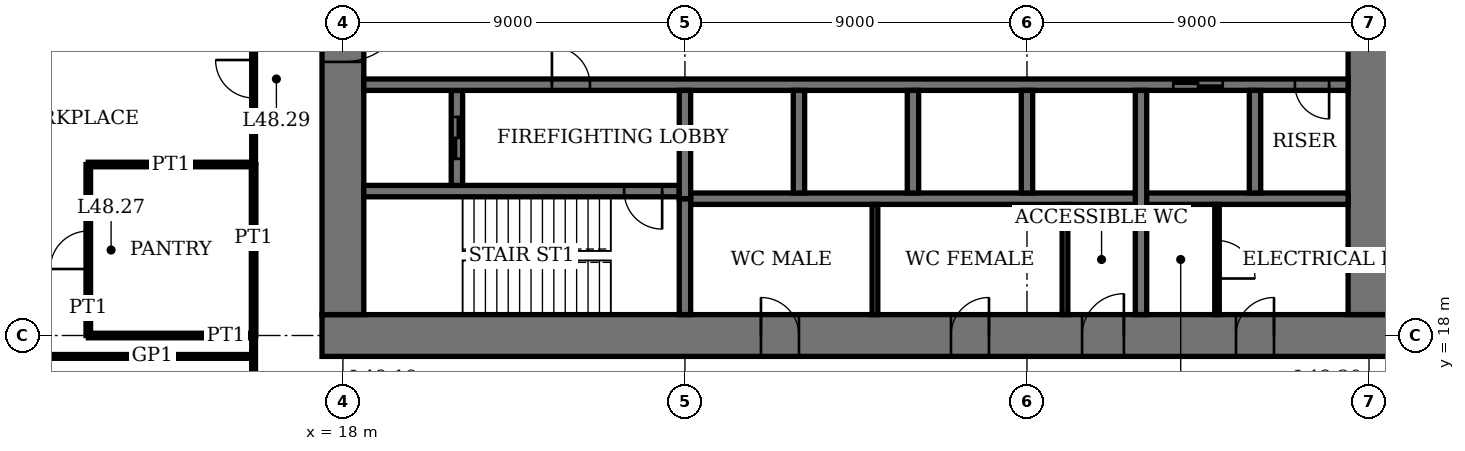
"""IFC4 building model, lengths in metres.
Left out: names, types, materials, properties, quantities, classifications, styles, units other than length and angle.
Written with IfcOpenShell. Run it as: python <this file> out.ifc"""

import sys

from ifc_helpers import new_model, si_unit, direction, frame, frame_2d, origin, place, context, subcontext, project, spatial, rectangle, extrude, element, fill, save


model = new_model("IFC4")
c1 = context("Model", 3, precision=1e-05, world=origin(), true_north=direction((0.0, 1.0)))
c2 = subcontext(c1, "Body", "Model", "MODEL_VIEW")
j1 = project(units=[si_unit("LENGTHUNIT", "METRE"), si_unit("PLANEANGLEUNIT", "RADIAN")], contexts=[c1])
p1 = place(None, origin())
s1 = spatial("IfcSite", under=j1, at=p1, CompositionType="ELEMENT")
p2 = place(p1, origin())
s2 = spatial("IfcBuilding", under=s1, at=p2, CompositionType="ELEMENT")
p3 = place(p2, frame((0.0, 0.0, 198.2)))
s3 = spatial("IfcBuildingStorey", under=s2, at=p3, CompositionType="ELEMENT", Elevation=198.2)
p4 = place(p3, frame((17.45, 18.0, 0.0), z_axis=(0.0, 0.0, 1.0), x_axis=(1.0, 0.0, 0.0)))
e1 = element("IfcWall", 1, at=p4, inside=s3, PredefinedType="SHEAR", context=c2, shape_type="SweptSolid", body=[
    extrude(rectangle(XDim=28.1, YDim=1.1, at=frame_2d((14.05, 0.0))), origin(), (0.0, 0.0, 1.0), 4.0),
])
p5 = place(p4, frame((11.55, 0.0, 0.0)))
e2 = element("IfcOpeningElement", 2, at=p5, cuts=e1, PredefinedType="OPENING", context=c2, shape_type="SweptSolid", body=[
    extrude(rectangle(XDim=1.0, YDim=2.4, at=frame_2d((0.5, 1.2))), frame((0.0, 0.56, 0.0), z_axis=(0.0, -1.0, 0.0), x_axis=(1.0, 0.0, 0.0)), (0.0, 0.0, 1.0), 1.12),
])
p6 = place(p4, frame((16.55, 0.0, 0.0)))
e3 = element("IfcOpeningElement", 3, at=p6, cuts=e1, PredefinedType="OPENING", context=c2, shape_type="SweptSolid", body=[
    extrude(rectangle(XDim=1.0, YDim=2.4, at=frame_2d((0.5, 1.2))), frame((0.0, 0.56, 0.0), z_axis=(0.0, -1.0, 0.0), x_axis=(1.0, 0.0, 0.0)), (0.0, 0.0, 1.0), 1.12),
])
p7 = place(p4, frame((20.0, 0.0, 0.0)))
e4 = element("IfcOpeningElement", 4, at=p7, cuts=e1, PredefinedType="OPENING", context=c2, shape_type="SweptSolid", body=[
    extrude(rectangle(XDim=1.1, YDim=2.4, at=frame_2d((0.55, 1.2))), frame((0.0, 0.56, 0.0), z_axis=(0.0, -1.0, 0.0), x_axis=(1.0, 0.0, 0.0)), (0.0, 0.0, 1.0), 1.12),
])
p8 = place(p4, frame((24.05, 0.0, 0.0)))
e5 = element("IfcOpeningElement", 5, at=p8, cuts=e1, PredefinedType="OPENING", context=c2, shape_type="SweptSolid", body=[
    extrude(rectangle(XDim=1.0, YDim=2.4, at=frame_2d((0.5, 1.2))), frame((0.0, 0.56, 0.0), z_axis=(0.0, -1.0, 0.0), x_axis=(1.0, 0.0, 0.0)), (0.0, 0.0, 1.0), 1.12),
])
p9 = place(p3, frame((18.0, 35.45, 0.0), z_axis=(0.0, 0.0, 1.0), x_axis=(0.0, -1.0, 0.0)))
e6 = element("IfcWall", 6, at=p9, inside=s3, PredefinedType="SHEAR", context=c2, shape_type="SweptSolid", body=[
    extrude(rectangle(XDim=16.9, YDim=1.1, at=frame_2d((8.45, 0.0))), origin(), (0.0, 0.0, 1.0), 4.0),
])
p10 = place(p9, frame((8.45, 0.0, 0.0)))
e7 = element("IfcOpeningElement", 7, at=p10, cuts=e6, PredefinedType="OPENING", context=c2, shape_type="SweptSolid", body=[
    extrude(rectangle(XDim=1.8, YDim=2.4, at=frame_2d((0.9, 1.2))), frame((0.0, 0.56, 0.0), z_axis=(0.0, -1.0, 0.0), x_axis=(1.0, 0.0, 0.0)), (0.0, 0.0, 1.0), 1.12),
])
p11 = place(p3, frame((45.0, 18.55, 0.0), z_axis=(0.0, 0.0, 1.0), x_axis=(0.0, 1.0, 0.0)))
e8 = element("IfcWall", 8, at=p11, inside=s3, PredefinedType="SHEAR", context=c2, shape_type="SweptSolid", body=[
    extrude(rectangle(XDim=16.9, YDim=1.1, at=frame_2d((8.45, 0.0))), origin(), (0.0, 0.0, 1.0), 4.0),
])
p12 = place(p11, frame((8.45, 0.0, 0.0)))
e9 = element("IfcOpeningElement", 9, at=p12, cuts=e8, PredefinedType="OPENING", context=c2, shape_type="SweptSolid", body=[
    extrude(rectangle(XDim=1.8, YDim=2.4, at=frame_2d((0.9, 1.2))), frame((0.0, 0.56, 0.0), z_axis=(0.0, -1.0, 0.0), x_axis=(1.0, 0.0, 0.0)), (0.0, 0.0, 1.0), 1.12),
])
p13 = place(p3, frame((18.55, 21.8, 0.0), z_axis=(0.0, 0.0, 1.0), x_axis=(1.0, 0.0, 0.0)))
e10 = element("IfcWall", 10, at=p13, inside=s3, PredefinedType="SHEAR", context=c2, shape_type="SweptSolid", body=[
    extrude(rectangle(XDim=8.3, YDim=0.3, at=frame_2d((4.15, 0.0))), origin(), (0.0, 0.0, 1.0), 4.0),
])
p14 = place(p13, frame((6.85, 0.0, 0.0)))
e11 = element("IfcOpeningElement", 11, at=p14, cuts=e10, PredefinedType="OPENING", context=c2, shape_type="SweptSolid", body=[
    extrude(rectangle(XDim=1.0, YDim=2.4, at=frame_2d((0.5, 1.2))), frame((0.0, 0.16, 0.0), z_axis=(0.0, -1.0, 0.0), x_axis=(1.0, 0.0, 0.0)), (0.0, 0.0, 1.0), 0.32),
])
p15 = place(p3, frame((27.0, 18.55, 0.0), z_axis=(0.0, 0.0, 1.0), x_axis=(0.0, 1.0, 0.0)))
e12 = element("IfcWall", 12, at=p15, inside=s3, PredefinedType="SHEAR", context=c2, shape_type="SweptSolid", body=[
    extrude(rectangle(XDim=3.05, YDim=0.3, at=frame_2d((1.525, 0.0))), origin(), (0.0, 0.0, 1.0), 4.0),
])
p16 = place(p3, frame((21.0, 21.95, 0.0), z_axis=(0.0, 0.0, 1.0), x_axis=(0.0, 1.0, 0.0)))
e13 = element("IfcWall", 13, at=p16, inside=s3, PredefinedType="SHEAR", context=c2, shape_type="SweptSolid", body=[
    extrude(rectangle(XDim=2.5, YDim=0.3, at=frame_2d((1.25, 0.0))), origin(), (0.0, 0.0, 1.0), 4.0),
])
p17 = place(p16, frame((0.7, 0.0, 0.0)))
e14 = element("IfcOpeningElement", 14, at=p17, cuts=e13, PredefinedType="OPENING", context=c2, shape_type="SweptSolid", body=[
    extrude(rectangle(XDim=1.1, YDim=2.4, at=frame_2d((0.55, 1.2))), frame((0.0, 0.16, 0.0), z_axis=(0.0, -1.0, 0.0), x_axis=(1.0, 0.0, 0.0)), (0.0, 0.0, 1.0), 0.32),
])
p18 = place(p3, frame((18.55, 24.6, 0.0), z_axis=(0.0, 0.0, 1.0), x_axis=(1.0, 0.0, 0.0)))
e15 = element("IfcWall", 15, at=p18, inside=s3, PredefinedType="SHEAR", context=c2, shape_type="SweptSolid", body=[
    extrude(rectangle(XDim=25.9, YDim=0.3, at=frame_2d((12.95, 0.0))), origin(), (0.0, 0.0, 1.0), 4.0),
])
p19 = place(p18, frame((4.95, 0.0, 0.0)))
e16 = element("IfcOpeningElement", 16, at=p19, cuts=e15, PredefinedType="OPENING", context=c2, shape_type="SweptSolid", body=[
    extrude(rectangle(XDim=1.0, YDim=2.4, at=frame_2d((0.5, 1.2))), frame((0.0, 0.16, 0.0), z_axis=(0.0, -1.0, 0.0), x_axis=(1.0, 0.0, 0.0)), (0.0, 0.0, 1.0), 0.32),
])
p20 = place(p18, frame((24.5, 0.0, 0.0)))
e17 = element("IfcOpeningElement", 17, at=p20, cuts=e15, PredefinedType="OPENING", context=c2, shape_type="SweptSolid", body=[
    extrude(rectangle(XDim=0.9, YDim=2.1, at=frame_2d((0.45, 1.05))), frame((0.0, 0.16, 0.0), z_axis=(0.0, -1.0, 0.0), x_axis=(1.0, 0.0, 0.0)), (0.0, 0.0, 1.0), 0.32),
])
p21 = place(p18, frame((21.3, 0.0, 0.0)))
e18 = element("IfcOpeningElement", 18, at=p21, cuts=e15, PredefinedType="OPENING", context=c2, shape_type="SweptSolid", body=[
    extrude(rectangle(XDim=1.3, YDim=2.4, at=frame_2d((0.65, 1.2))), frame((0.0, 0.16, 0.0), z_axis=(0.0, -1.0, 0.0), x_axis=(1.0, 0.0, 0.0)), (0.0, 0.0, 1.0), 0.32),
])
p22 = place(p3, frame((27.15, 21.6, 0.0), z_axis=(0.0, 0.0, 1.0), x_axis=(1.0, 0.0, 0.0)))
e19 = element("IfcWall", 19, at=p22, inside=s3, PredefinedType="SHEAR", context=c2, shape_type="SweptSolid", body=[
    extrude(rectangle(XDim=17.3, YDim=0.3, at=frame_2d((8.65, 0.0))), origin(), (0.0, 0.0, 1.0), 4.0),
])
for number, where, z_axis, x_axis in (
    (20, (30.0, 21.75, 0.0), (0.0, 0.0, 1.0), (0.0, 1.0, 0.0)),
    (21, (33.0, 21.75, 0.0), (0.0, 0.0, 1.0), (0.0, 1.0, 0.0)),
    (22, (36.0, 21.75, 0.0), (0.0, 0.0, 1.0), (0.0, 1.0, 0.0)),
):
    element("IfcWall", number, at=place(p3, frame(where, z_axis=z_axis, x_axis=x_axis)), inside=s3, PredefinedType="SHEAR", context=c2, shape_type="SweptSolid", body=[
        extrude(rectangle(XDim=2.7, YDim=0.3, at=frame_2d((1.35, 0.0))), origin(), (0.0, 0.0, 1.0), 4.0),
    ])
p23 = place(p3, frame((39.0, 18.55, 0.0), z_axis=(0.0, 0.0, 1.0), x_axis=(0.0, 1.0, 0.0)))
e23 = element("IfcWall", 23, at=p23, inside=s3, PredefinedType="SHEAR", context=c2, shape_type="SweptSolid", body=[
    extrude(rectangle(XDim=5.9, YDim=0.3, at=frame_2d((2.95, 0.0))), origin(), (0.0, 0.0, 1.0), 4.0),
])
p24 = place(p3, frame((42.0, 21.75, 0.0), z_axis=(0.0, 0.0, 1.0), x_axis=(0.0, 1.0, 0.0)))
e24 = element("IfcWall", 24, at=p24, inside=s3, PredefinedType="SHEAR", context=c2, shape_type="SweptSolid", body=[
    extrude(rectangle(XDim=2.7, YDim=0.3, at=frame_2d((1.35, 0.0))), origin(), (0.0, 0.0, 1.0), 4.0),
])
p25 = place(p3, frame((27.0, 21.6, 0.0), z_axis=(0.0, 0.0, 1.0), x_axis=(0.0, 1.0, 0.0)))
e25 = element("IfcWall", 25, at=p25, inside=s3, PredefinedType="SHEAR", context=c2, shape_type="SweptSolid", body=[
    extrude(rectangle(XDim=2.85, YDim=0.3, at=frame_2d((1.425, 0.0))), origin(), (0.0, 0.0, 1.0), 4.0),
])
p26 = place(p3, frame((9.7, 17.45, 0.0), z_axis=(0.0, 0.0, 1.0), x_axis=(1.0, 0.0, 0.0)))
e26 = element("IfcWall", 26, at=p26, inside=s3, PredefinedType="PARTITIONING", context=c2, shape_type="SweptSolid", body=[
    extrude(rectangle(XDim=5.95, YDim=0.1, at=frame_2d((2.975, 0.0))), origin(), (0.0, 0.0, 1.0), 3.75),
])
p27 = place(p3, frame((11.3, 18.0, 0.0), z_axis=(0.0, 0.0, 1.0), x_axis=(1.0, 0.0, 0.0)))
e27 = element("IfcWall", 27, at=p27, inside=s3, PredefinedType="PARTITIONING", context=c2, shape_type="SweptSolid", body=[
    extrude(rectangle(XDim=4.35, YDim=0.12, at=frame_2d((2.175, 0.0))), origin(), (0.0, 0.0, 1.0), 3.05),
])
p28 = place(p3, frame((11.3, 22.5, 0.0), z_axis=(0.0, 0.0, 1.0), x_axis=(1.0, 0.0, 0.0)))
e28 = element("IfcWall", 28, at=p28, inside=s3, PredefinedType="PARTITIONING", context=c2, shape_type="SweptSolid", body=[
    extrude(rectangle(XDim=4.35, YDim=0.12, at=frame_2d((2.175, 0.0))), origin(), (0.0, 0.0, 1.0), 3.1),
])
p29 = place(p3, frame((11.3, 18.0, 0.0), z_axis=(0.0, 0.0, 1.0), x_axis=(0.0, 1.0, 0.0)))
e29 = element("IfcWall", 29, at=p29, inside=s3, PredefinedType="PARTITIONING", context=c2, shape_type="SweptSolid", body=[
    extrude(rectangle(XDim=4.5, YDim=0.12, at=frame_2d((2.25, 0.0))), origin(), (0.0, 0.0, 1.0), 3.75),
])
p30 = place(p29, frame((1.75, 0.0, 0.0)))
e30 = element("IfcOpeningElement", 30, at=p30, cuts=e29, PredefinedType="OPENING", context=c2, shape_type="SweptSolid", body=[
    extrude(rectangle(XDim=1.0, YDim=2.4, at=frame_2d((0.5, 1.2))), frame((0.0, 0.07, 0.0), z_axis=(0.0, -1.0, 0.0), x_axis=(1.0, 0.0, 0.0)), (0.0, 0.0, 1.0), 0.14),
])
p31 = place(p3, frame((15.65, 18.0, 0.0), z_axis=(0.0, 0.0, 1.0), x_axis=(0.0, 1.0, 0.0)))
e31 = element("IfcWall", 31, at=p31, inside=s3, PredefinedType="PARTITIONING", context=c2, shape_type="SweptSolid", body=[
    extrude(rectangle(XDim=4.5, YDim=0.12, at=frame_2d((2.25, 0.0))), origin(), (0.0, 0.0, 1.0), 3.75),
])
p32 = place(p3, frame((15.65, 15.65, 0.0), z_axis=(0.0, 0.0, 1.0), x_axis=(0.0, 1.0, 0.0)))
e32 = element("IfcWall", 32, at=p32, inside=s3, PredefinedType="PARTITIONING", context=c2, shape_type="SweptSolid", body=[
    extrude(rectangle(XDim=2.35, YDim=0.1, at=frame_2d((1.175, 0.0))), origin(), (0.0, 0.0, 1.0), 3.75),
])
p33 = place(p3, frame((15.65, 22.5, 0.0), z_axis=(0.0, 0.0, 1.0), x_axis=(0.0, 1.0, 0.0)))
e33 = element("IfcWall", 33, at=p33, inside=s3, PredefinedType="PARTITIONING", context=c2, shape_type="SweptSolid", body=[
    extrude(rectangle(XDim=4.5, YDim=0.1, at=frame_2d((2.25, 0.0))), origin(), (0.0, 0.0, 1.0), 3.75),
])
p34 = place(p33, frame((1.75, 0.0, 0.0)))
e34 = element("IfcOpeningElement", 34, at=p34, cuts=e33, PredefinedType="OPENING", context=c2, shape_type="SweptSolid", body=[
    extrude(rectangle(XDim=1.0, YDim=2.4, at=frame_2d((0.5, 1.2))), frame((0.0, 0.06, 0.0), z_axis=(0.0, -1.0, 0.0), x_axis=(1.0, 0.0, 0.0)), (0.0, 0.0, 1.0), 0.12),
])
for number, where, z_axis, x_axis in (
    (35, (32.0, 18.55, 0.0), (0.0, 0.0, 1.0), (0.0, 1.0, 0.0)),
    (36, (37.0, 18.55, 0.0), (0.0, 0.0, 1.0), (0.0, 1.0, 0.0)),
):
    element("IfcWall", number, at=place(p3, frame(where, z_axis=z_axis, x_axis=x_axis)), inside=s3, PredefinedType="PARTITIONING", context=c2, shape_type="SweptSolid", body=[
        extrude(rectangle(XDim=2.9, YDim=0.15, at=frame_2d((1.45, 0.0))), origin(), (0.0, 0.0, 1.0), 3.75),
    ])
p35 = place(p3, frame((41.0, 18.55, 0.0), z_axis=(0.0, 0.0, 1.0), x_axis=(0.0, 1.0, 0.0)))
e37 = element("IfcWall", 37, at=p35, inside=s3, PredefinedType="PARTITIONING", context=c2, shape_type="SweptSolid", body=[
    extrude(rectangle(XDim=2.9, YDim=0.12, at=frame_2d((1.45, 0.0))), origin(), (0.0, 0.0, 1.0), 3.75),
])
p36 = place(p35, frame((0.95, 0.0, 0.0)))
e38 = element("IfcOpeningElement", 38, at=p36, cuts=e37, PredefinedType="OPENING", context=c2, shape_type="SweptSolid", body=[
    extrude(rectangle(XDim=1.0, YDim=2.4, at=frame_2d((0.5, 1.2))), frame((0.0, 0.07, 0.0), z_axis=(0.0, -1.0, 0.0), x_axis=(1.0, 0.0, 0.0)), (0.0, 0.0, 1.0), 0.14),
])
p37 = place(p10, origin())
e39 = element("IfcDoor", 39, at=p37, inside=s3, OperationType="DOUBLE_DOOR_DOUBLE_SWING", PredefinedType="DOOR", context=c2, shape_type="SweptSolid", body=[
    extrude(rectangle(XDim=1.8, YDim=2.4, at=frame_2d((0.9, 1.2))), frame((0.0, 0.03, 0.0), z_axis=(0.0, -1.0, 0.0), x_axis=(1.0, 0.0, 0.0)), (0.0, 0.0, 1.0), 0.06),
    extrude(rectangle(XDim=0.04, YDim=2.4, at=frame_2d((0.02, 1.2))), frame((0.0, 0.55, 0.0), z_axis=(0.0, -1.0, 0.0), x_axis=(1.0, 0.0, 0.0)), (0.0, 0.0, 1.0), 1.1),
    extrude(rectangle(XDim=0.04, YDim=2.4, at=frame_2d((1.78, 1.2))), frame((0.0, 0.55, 0.0), z_axis=(0.0, -1.0, 0.0), x_axis=(1.0, 0.0, 0.0)), (0.0, 0.0, 1.0), 1.1),
    extrude(rectangle(XDim=1.8, YDim=0.04, at=frame_2d((0.9, 2.38))), frame((0.0, 0.55, 0.0), z_axis=(0.0, -1.0, 0.0), x_axis=(1.0, 0.0, 0.0)), (0.0, 0.0, 1.0), 1.1),
])
fill(e7, e39)
p38 = place(p5, origin())
e40 = element("IfcDoor", 40, at=p38, inside=s3, OperationType="SINGLE_SWING_RIGHT", PredefinedType="DOOR", context=c2, shape_type="SweptSolid", body=[
    extrude(rectangle(XDim=1.0, YDim=2.4, at=frame_2d((0.5, 1.2))), frame((0.0, 0.025, 0.0), z_axis=(0.0, -1.0, 0.0), x_axis=(1.0, 0.0, 0.0)), (0.0, 0.0, 1.0), 0.05),
    extrude(rectangle(XDim=0.04, YDim=2.4, at=frame_2d((0.02, 1.2))), frame((0.0, 0.4, 0.0), z_axis=(0.0, -1.0, 0.0), x_axis=(1.0, 0.0, 0.0)), (0.0, 0.0, 1.0), 0.8),
    extrude(rectangle(XDim=0.04, YDim=2.4, at=frame_2d((0.98, 1.2))), frame((0.0, 0.4, 0.0), z_axis=(0.0, -1.0, 0.0), x_axis=(1.0, 0.0, 0.0)), (0.0, 0.0, 1.0), 0.8),
    extrude(rectangle(XDim=1.0, YDim=0.04, at=frame_2d((0.5, 2.38))), frame((0.0, 0.4, 0.0), z_axis=(0.0, -1.0, 0.0), x_axis=(1.0, 0.0, 0.0)), (0.0, 0.0, 1.0), 0.8),
])
fill(e2, e40)
p39 = place(p6, origin())
e41 = element("IfcDoor", 41, at=p39, inside=s3, OperationType="SINGLE_SWING_LEFT", PredefinedType="DOOR", context=c2, shape_type="SweptSolid", body=[
    extrude(rectangle(XDim=1.0, YDim=2.4, at=frame_2d((0.5, 1.2))), frame((0.0, 0.025, 0.0), z_axis=(0.0, -1.0, 0.0), x_axis=(1.0, 0.0, 0.0)), (0.0, 0.0, 1.0), 0.05),
    extrude(rectangle(XDim=0.04, YDim=2.4, at=frame_2d((0.02, 1.2))), frame((0.0, 0.4, 0.0), z_axis=(0.0, -1.0, 0.0), x_axis=(1.0, 0.0, 0.0)), (0.0, 0.0, 1.0), 0.8),
    extrude(rectangle(XDim=0.04, YDim=2.4, at=frame_2d((0.98, 1.2))), frame((0.0, 0.4, 0.0), z_axis=(0.0, -1.0, 0.0), x_axis=(1.0, 0.0, 0.0)), (0.0, 0.0, 1.0), 0.8),
    extrude(rectangle(XDim=1.0, YDim=0.04, at=frame_2d((0.5, 2.38))), frame((0.0, 0.4, 0.0), z_axis=(0.0, -1.0, 0.0), x_axis=(1.0, 0.0, 0.0)), (0.0, 0.0, 1.0), 0.8),
])
fill(e3, e41)
p40 = place(p7, origin())
e42 = element("IfcDoor", 42, at=p40, inside=s3, OperationType="SINGLE_SWING_LEFT", PredefinedType="DOOR", context=c2, shape_type="SweptSolid", body=[
    extrude(rectangle(XDim=1.1, YDim=2.4, at=frame_2d((0.55, 1.2))), frame((0.0, 0.025, 0.0), z_axis=(0.0, -1.0, 0.0), x_axis=(1.0, 0.0, 0.0)), (0.0, 0.0, 1.0), 0.05),
    extrude(rectangle(XDim=0.04, YDim=2.4, at=frame_2d((0.02, 1.2))), frame((0.0, 0.44, 0.0), z_axis=(0.0, -1.0, 0.0), x_axis=(1.0, 0.0, 0.0)), (0.0, 0.0, 1.0), 0.88),
    extrude(rectangle(XDim=0.04, YDim=2.4, at=frame_2d((1.08, 1.2))), frame((0.0, 0.44, 0.0), z_axis=(0.0, -1.0, 0.0), x_axis=(1.0, 0.0, 0.0)), (0.0, 0.0, 1.0), 0.88),
    extrude(rectangle(XDim=1.1, YDim=0.04, at=frame_2d((0.55, 2.38))), frame((0.0, 0.44, 0.0), z_axis=(0.0, -1.0, 0.0), x_axis=(1.0, 0.0, 0.0)), (0.0, 0.0, 1.0), 0.88),
])
fill(e4, e42)
p41 = place(p8, origin())
e43 = element("IfcDoor", 43, at=p41, inside=s3, OperationType="SINGLE_SWING_LEFT", PredefinedType="DOOR", context=c2, shape_type="SweptSolid", body=[
    extrude(rectangle(XDim=1.0, YDim=2.4, at=frame_2d((0.5, 1.2))), frame((0.0, 0.025, 0.0), z_axis=(0.0, -1.0, 0.0), x_axis=(1.0, 0.0, 0.0)), (0.0, 0.0, 1.0), 0.05),
    extrude(rectangle(XDim=0.04, YDim=2.4, at=frame_2d((0.02, 1.2))), frame((0.0, 0.4, 0.0), z_axis=(0.0, -1.0, 0.0), x_axis=(1.0, 0.0, 0.0)), (0.0, 0.0, 1.0), 0.8),
    extrude(rectangle(XDim=0.04, YDim=2.4, at=frame_2d((0.98, 1.2))), frame((0.0, 0.4, 0.0), z_axis=(0.0, -1.0, 0.0), x_axis=(1.0, 0.0, 0.0)), (0.0, 0.0, 1.0), 0.8),
    extrude(rectangle(XDim=1.0, YDim=0.04, at=frame_2d((0.5, 2.38))), frame((0.0, 0.4, 0.0), z_axis=(0.0, -1.0, 0.0), x_axis=(1.0, 0.0, 0.0)), (0.0, 0.0, 1.0), 0.8),
])
fill(e5, e43)
p42 = place(p14, origin())
e44 = element("IfcDoor", 44, at=p42, inside=s3, OperationType="SINGLE_SWING_RIGHT", PredefinedType="DOOR", context=c2, shape_type="SweptSolid", body=[
    extrude(rectangle(XDim=1.0, YDim=2.4, at=frame_2d((0.5, 1.2))), frame((0.0, 0.03, 0.0), z_axis=(0.0, -1.0, 0.0), x_axis=(1.0, 0.0, 0.0)), (0.0, 0.0, 1.0), 0.06),
])
fill(e11, e44)
p43 = place(p19, origin())
e45 = element("IfcDoor", 45, at=p43, inside=s3, OperationType="SINGLE_SWING_RIGHT", PredefinedType="DOOR", context=c2, shape_type="SweptSolid", body=[
    extrude(rectangle(XDim=1.0, YDim=2.4, at=frame_2d((0.5, 1.2))), frame((0.0, 0.03, 0.0), z_axis=(0.0, -1.0, 0.0), x_axis=(1.0, 0.0, 0.0)), (0.0, 0.0, 1.0), 0.06),
])
fill(e16, e45)
p44 = place(p20, origin())
e46 = element("IfcDoor", 46, at=p44, inside=s3, OperationType="SINGLE_SWING_RIGHT", PredefinedType="DOOR", context=c2, shape_type="SweptSolid", body=[
    extrude(rectangle(XDim=0.9, YDim=2.1, at=frame_2d((0.45, 1.05))), frame((0.0, 0.03, 0.0), z_axis=(0.0, -1.0, 0.0), x_axis=(1.0, 0.0, 0.0)), (0.0, 0.0, 1.0), 0.06),
])
fill(e17, e46)
p45 = place(p30, origin())
e47 = element("IfcDoor", 47, at=p45, inside=s3, OperationType="SINGLE_SWING_RIGHT", PredefinedType="DOOR", context=c2, shape_type="SweptSolid", body=[
    extrude(rectangle(XDim=1.0, YDim=2.4, at=frame_2d((0.5, 1.2))), frame((0.0, 0.025, 0.0), z_axis=(0.0, -1.0, 0.0), x_axis=(1.0, 0.0, 0.0)), (0.0, 0.0, 1.0), 0.05),
])
fill(e30, e47)
p46 = place(p34, origin())
e48 = element("IfcDoor", 48, at=p46, inside=s3, OperationType="SINGLE_SWING_LEFT", PredefinedType="DOOR", context=c2, shape_type="SweptSolid", body=[
    extrude(rectangle(XDim=1.0, YDim=2.4, at=frame_2d((0.5, 1.2))), frame((0.0, 0.02, 0.0), z_axis=(0.0, -1.0, 0.0), x_axis=(1.0, 0.0, 0.0)), (0.0, 0.0, 1.0), 0.04),
])
fill(e34, e48)
p47 = place(p36, origin())
e49 = element("IfcDoor", 49, at=p47, inside=s3, OperationType="SINGLE_SWING_LEFT", PredefinedType="DOOR", context=c2, shape_type="SweptSolid", body=[
    extrude(rectangle(XDim=1.0, YDim=2.4, at=frame_2d((0.5, 1.2))), frame((0.0, 0.03, 0.0), z_axis=(0.0, -1.0, 0.0), x_axis=(1.0, 0.0, 0.0)), (0.0, 0.0, 1.0), 0.06),
])
fill(e38, e49)
p48 = place(p21, origin())
e50 = element("IfcDoor", 50, at=p48, inside=s3, OperationType="DOUBLE_DOOR_SLIDING", PredefinedType="DOOR", context=c2, shape_type="SweptSolid", body=[
    extrude(rectangle(XDim=1.3, YDim=2.4, at=frame_2d((0.65, 1.2))), frame((0.0, 0.02, 0.0), z_axis=(0.0, -1.0, 0.0), x_axis=(1.0, 0.0, 0.0)), (0.0, 0.0, 1.0), 0.04),
])
fill(e18, e50)
p49 = place(p17, origin())
e51 = element("IfcDoor", 51, at=p49, inside=s3, OperationType="DOUBLE_DOOR_SLIDING", PredefinedType="DOOR", context=c2, shape_type="SweptSolid", body=[
    extrude(rectangle(XDim=1.1, YDim=2.4, at=frame_2d((0.55, 1.2))), frame((0.0, 0.03, 0.0), z_axis=(0.0, -1.0, 0.0), x_axis=(1.0, 0.0, 0.0)), (0.0, 0.0, 1.0), 0.06),
])
fill(e14, e51)
save(model, sys.argv[1])
